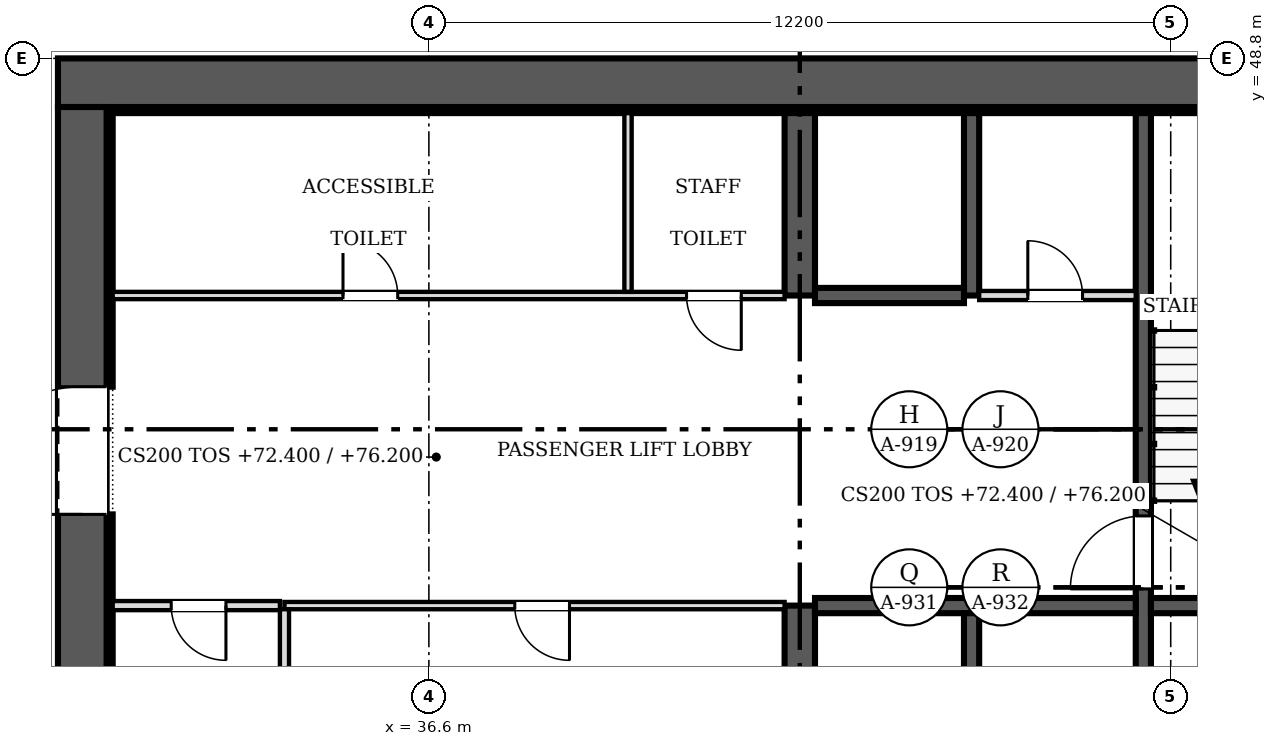
"""IFC4 building model, lengths in metres.
Left out: names, types, materials, properties, quantities, classifications, styles, units other than length and angle.
Written with IfcOpenShell. Run it as: python <this file> out.ifc"""

import sys

from ifc_helpers import new_model, si_unit, direction, frame, frame_2d, origin, place, context, subcontext, project, spatial, rectangle, extrude, source, transform, mapped, element, fill, save


model = new_model("IFC4")
c1 = context("Model", 3, precision=1e-05, world=origin(), true_north=direction((0.0, 1.0)))
c2 = subcontext(c1, "Body", "Model", "MODEL_VIEW")
j1 = project(units=[si_unit("LENGTHUNIT", "METRE"), si_unit("PLANEANGLEUNIT", "RADIAN")], contexts=[c1])
p1 = place(None, origin())
s1 = spatial("IfcSite", under=j1, at=p1, CompositionType="ELEMENT")
p2 = place(p1, origin())
s2 = spatial("IfcBuilding", under=s1, at=p2, CompositionType="ELEMENT")
p3 = place(p2, frame((0.0, 0.0, 72.4)))
s3 = spatial("IfcBuildingStorey", under=s2, at=p3, CompositionType="ELEMENT", Elevation=72.4)
p4 = place(p3, frame((30.9, 25.2, 0.0), z_axis=(0.0, 0.0, 1.0), x_axis=(0.0, 1.0, 0.0)))
e1 = element("IfcWall", 1, at=p4, inside=s3, PredefinedType="SHEAR", context=c2, shape_type="SweptSolid", body=[
    extrude(rectangle(XDim=22.8, YDim=0.8, at=frame_2d((11.4, 0.0))), origin(), (0.0, 0.0, 1.0), 3.8),
])
m1 = source(origin(), c2, "Body", "SweptSolid", [
    extrude(rectangle(XDim=2.1, YDim=2.4, at=frame_2d((1.05, 1.2))), frame((0.0, 0.41, 0.0), z_axis=(0.0, -1.0, 0.0), x_axis=(1.0, 0.0, 0.0)), (0.0, 0.0, 1.0), 0.82),
])
p5 = place(p4, frame((4.6, 0.0, 0.0)))
e2 = element("IfcOpeningElement", 2, at=p5, cuts=e1, PredefinedType="OPENING", context=c2, shape_type="MappedRepresentation", body=[
    mapped(m1, transform((0.0, 0.0, 0.0), scale=1.0)),
])
p6 = place(p4, frame((16.1, 0.0, 0.0)))
e3 = element("IfcOpeningElement", 3, at=p6, cuts=e1, PredefinedType="OPENING", context=c2, shape_type="MappedRepresentation", body=[
    mapped(m1, transform((0.0, 0.0, 0.0), scale=1.0)),
])
p7 = place(p3, frame((30.5, 48.4, 0.0), z_axis=(0.0, 0.0, 1.0), x_axis=(1.0, 0.0, 0.0)))
e4 = element("IfcWall", 4, at=p7, inside=s3, PredefinedType="SHEAR", context=c2, shape_type="SweptSolid", body=[
    extrude(rectangle(XDim=24.4, YDim=0.8, at=frame_2d((12.2, 0.0))), origin(), (0.0, 0.0, 1.0), 3.8),
])
p8 = place(p3, frame((31.3, 47.95, 0.0), z_axis=(0.0, 0.0, 1.0), x_axis=(1.0, 0.0, 0.0)))
e5 = element("IfcWall", 5, at=p8, inside=s3, PredefinedType="SOLIDWALL", context=c2, shape_type="SweptSolid", body=[
    extrude(rectangle(XDim=22.8, YDim=0.1, at=frame_2d((11.4, 0.0))), origin(), (0.0, 0.0, 1.0), 3.8),
])
p9 = place(p3, frame((31.35, 31.9, 0.0), z_axis=(0.0, 0.0, 1.0), x_axis=(0.0, 1.0, 0.0)))
e6 = element("IfcWall", 6, at=p9, inside=s3, PredefinedType="SOLIDWALL", context=c2, shape_type="SweptSolid", body=[
    extrude(rectangle(XDim=9.4, YDim=0.1, at=frame_2d((4.7, 0.0))), origin(), (0.0, 0.0, 1.0), 3.8),
])
p10 = place(p3, frame((31.35, 43.4, 0.0), z_axis=(0.0, 0.0, 1.0), x_axis=(0.0, 1.0, 0.0)))
e7 = element("IfcWall", 7, at=p10, inside=s3, PredefinedType="SOLIDWALL", context=c2, shape_type="SweptSolid", body=[
    extrude(rectangle(XDim=4.5, YDim=0.1, at=frame_2d((2.25, 0.0))), origin(), (0.0, 0.0, 1.0), 3.8),
])
p11 = place(p3, frame((42.7, 36.85, 0.0), z_axis=(0.0, 0.0, 1.0), x_axis=(0.0, 1.0, 0.0)))
e8 = element("IfcWall", 8, at=p11, inside=s3, PredefinedType="SHEAR", context=c2, shape_type="SweptSolid", body=[
    extrude(rectangle(XDim=2.95, YDim=0.5, at=frame_2d((1.475, 0.0))), origin(), (0.0, 0.0, 1.0), 3.8),
])
p12 = place(p3, frame((42.7, 44.9, 0.0), z_axis=(0.0, 0.0, 1.0), x_axis=(0.0, 1.0, 0.0)))
e9 = element("IfcWall", 9, at=p12, inside=s3, PredefinedType="SHEAR", context=c2, shape_type="SweptSolid", body=[
    extrude(rectangle(XDim=3.0, YDim=0.5, at=frame_2d((1.5, 0.0))), origin(), (0.0, 0.0, 1.0), 3.8),
])
p13 = place(p3, frame((48.35, 47.9, 0.0), z_axis=(0.0, 0.0, 1.0), x_axis=(0.0, -1.0, 0.0)))
e10 = element("IfcWall", 10, at=p13, inside=s3, PredefinedType="SOLIDWALL", context=c2, shape_type="SweptSolid", body=[
    extrude(rectangle(XDim=11.05, YDim=0.25, at=frame_2d((5.525, 0.0))), origin(), (0.0, 0.0, 1.0), 3.8),
])
m2 = source(origin(), c2, "Body", "SweptSolid", [
    extrude(rectangle(XDim=1.2, YDim=2.1, at=frame_2d((0.6, 1.05))), frame((0.0, 0.135, 0.0), z_axis=(0.0, -1.0, 0.0), x_axis=(1.0, 0.0, 0.0)), (0.0, 0.0, 1.0), 0.27),
])
p14 = place(p13, frame((6.625, 0.0, 0.0)))
e11 = element("IfcOpeningElement", 11, at=p14, cuts=e10, PredefinedType="OPENING", context=c2, shape_type="MappedRepresentation", body=[
    mapped(m2, transform((0.0, 0.0, 0.0), scale=1.0)),
])
p15 = place(p3, frame((42.95, 39.8, 0.0), z_axis=(0.0, 0.0, 1.0), x_axis=(1.0, 0.0, 0.0)))
e12 = element("IfcWall", 12, at=p15, inside=s3, PredefinedType="SOLIDWALL", context=c2, shape_type="SweptSolid", body=[
    extrude(rectangle(XDim=5.275, YDim=0.25, at=frame_2d((2.638, 0.0))), origin(), (0.0, 0.0, 1.0), 3.8),
])
p16 = place(p3, frame((48.475, 39.8, 0.0), z_axis=(0.0, 0.0, 1.0), x_axis=(1.0, 0.0, 0.0)))
e13 = element("IfcWall", 13, at=p16, inside=s3, PredefinedType="SOLIDWALL", context=c2, shape_type="SweptSolid", body=[
    extrude(rectangle(XDim=3.525, YDim=0.25, at=frame_2d((1.762, 0.0))), origin(), (0.0, 0.0, 1.0), 3.8),
])
p17 = place(p3, frame((45.525, 36.85, 0.0), z_axis=(0.0, 0.0, 1.0), x_axis=(0.0, 1.0, 0.0)))
e14 = element("IfcWall", 14, at=p17, inside=s3, PredefinedType="SOLIDWALL", context=c2, shape_type="SweptSolid", body=[
    extrude(rectangle(XDim=2.825, YDim=0.25, at=frame_2d((1.413, 0.0))), origin(), (0.0, 0.0, 1.0), 3.8),
])
p18 = place(p3, frame((45.525, 44.9, 0.0), z_axis=(0.0, 0.0, 1.0), x_axis=(0.0, 1.0, 0.0)))
e15 = element("IfcWall", 15, at=p18, inside=s3, PredefinedType="SOLIDWALL", context=c2, shape_type="SweptSolid", body=[
    extrude(rectangle(XDim=3.0, YDim=0.25, at=frame_2d((1.5, 0.0))), origin(), (0.0, 0.0, 1.0), 3.8),
])
p19 = place(p3, frame((42.95, 44.9, 0.0), z_axis=(0.0, 0.0, 1.0), x_axis=(1.0, 0.0, 0.0)))
e16 = element("IfcWall", 16, at=p19, inside=s3, PredefinedType="SOLIDWALL", context=c2, shape_type="SweptSolid", body=[
    extrude(rectangle(XDim=2.45, YDim=0.25, at=frame_2d((1.225, 0.0))), origin(), (0.0, 0.0, 1.0), 3.8),
])
p20 = place(p3, frame((31.4, 44.9, 0.0), z_axis=(0.0, 0.0, 1.0), x_axis=(1.0, 0.0, 0.0)))
e17 = element("IfcWall", 17, at=p20, inside=s3, PredefinedType="PARTITIONING", context=c2, shape_type="SweptSolid", body=[
    extrude(rectangle(XDim=11.05, YDim=0.12, at=frame_2d((5.525, 0.0))), origin(), (0.0, 0.0, 1.0), 3.6),
])
m3 = source(origin(), c2, "Body", "SweptSolid", [
    extrude(rectangle(XDim=0.9, YDim=2.1, at=frame_2d((0.45, 1.05))), frame((0.0, 0.07, 0.0), z_axis=(0.0, -1.0, 0.0), x_axis=(1.0, 0.0, 0.0)), (0.0, 0.0, 1.0), 0.14),
])
p21 = place(p20, frame((3.788, 0.0, 0.0)))
e18 = element("IfcOpeningElement", 18, at=p21, cuts=e17, PredefinedType="OPENING", context=c2, shape_type="MappedRepresentation", body=[
    mapped(m3, transform((0.0, 0.0, 0.0), scale=1.0)),
])
p22 = place(p20, frame((9.438, 0.0, 0.0)))
e19 = element("IfcOpeningElement", 19, at=p22, cuts=e17, PredefinedType="OPENING", context=c2, shape_type="MappedRepresentation", body=[
    mapped(m3, transform((0.0, 0.0, 0.0), scale=1.0)),
])
p23 = place(p3, frame((42.45, 39.8, 0.0), z_axis=(0.0, 0.0, 1.0), x_axis=(-1.0, 0.0, 0.0)))
e20 = element("IfcWall", 20, at=p23, inside=s3, PredefinedType="PARTITIONING", context=c2, shape_type="SweptSolid", body=[
    extrude(rectangle(XDim=8.225, YDim=0.12, at=frame_2d((4.112, 0.0))), origin(), (0.0, 0.0, 1.0), 3.6),
])
p24 = place(p23, frame((3.538, 0.0, 0.0)))
e21 = element("IfcOpeningElement", 21, at=p24, cuts=e20, PredefinedType="OPENING", context=c2, shape_type="MappedRepresentation", body=[
    mapped(m3, transform((0.0, 0.0, 0.0), scale=1.0)),
])
p25 = place(p3, frame((34.225, 36.85, 0.0), z_axis=(0.0, 0.0, 1.0), x_axis=(0.0, 1.0, 0.0)))
e22 = element("IfcWall", 22, at=p25, inside=s3, PredefinedType="PARTITIONING", context=c2, shape_type="SweptSolid", body=[
    extrude(rectangle(XDim=2.89, YDim=0.15, at=frame_2d((1.445, 0.0))), origin(), (0.0, 0.0, 1.0), 3.6),
])
p26 = place(p3, frame((39.875, 44.96, 0.0), z_axis=(0.0, 0.0, 1.0), x_axis=(0.0, 1.0, 0.0)))
e23 = element("IfcWall", 23, at=p26, inside=s3, PredefinedType="PARTITIONING", context=c2, shape_type="SweptSolid", body=[
    extrude(rectangle(XDim=2.94, YDim=0.12, at=frame_2d((1.47, 0.0))), origin(), (0.0, 0.0, 1.0), 3.6),
])
p27 = place(p3, frame((45.65, 44.9, 0.0), z_axis=(0.0, 0.0, 1.0), x_axis=(1.0, 0.0, 0.0)))
e24 = element("IfcWall", 24, at=p27, inside=s3, PredefinedType="PARTITIONING", context=c2, shape_type="SweptSolid", body=[
    extrude(rectangle(XDim=2.575, YDim=0.15, at=frame_2d((1.288, 0.0))), origin(), (0.0, 0.0, 1.0), 3.6),
])
m4 = source(origin(), c2, "Body", "SweptSolid", [
    extrude(rectangle(XDim=0.9, YDim=2.1, at=frame_2d((0.45, 1.05))), frame((0.0, 0.085, 0.0), z_axis=(0.0, -1.0, 0.0), x_axis=(1.0, 0.0, 0.0)), (0.0, 0.0, 1.0), 0.17),
])
p28 = place(p27, frame((0.8, 0.0, 0.0)))
e25 = element("IfcOpeningElement", 25, at=p28, cuts=e24, PredefinedType="OPENING", context=c2, shape_type="MappedRepresentation", body=[
    mapped(m4, transform((0.0, 0.0, 0.0), scale=1.0)),
])
p29 = place(p3, frame((34.15, 39.8, 0.0), z_axis=(0.0, 0.0, 1.0), x_axis=(-1.0, 0.0, 0.0)))
e26 = element("IfcWall", 26, at=p29, inside=s3, PredefinedType="PARTITIONING", context=c2, shape_type="SweptSolid", body=[
    extrude(rectangle(XDim=2.75, YDim=0.15, at=frame_2d((1.375, 0.0))), origin(), (0.0, 0.0, 1.0), 3.6),
])
p30 = place(p29, frame((0.887, 0.0, 0.0)))
e27 = element("IfcOpeningElement", 27, at=p30, cuts=e26, PredefinedType="OPENING", context=c2, shape_type="MappedRepresentation", body=[
    mapped(m4, transform((0.0, 0.0, 0.0), scale=1.0)),
])
m5 = source(origin(), c2, "Body", "SweptSolid", [
    extrude(rectangle(XDim=2.1, YDim=2.4, at=frame_2d((1.05, 1.2))), frame((0.0, 0.025, 0.0), z_axis=(0.0, -1.0, 0.0), x_axis=(1.0, 0.0, 0.0)), (0.0, 0.0, 1.0), 0.05),
])
p31 = place(p6, origin())
e28 = element("IfcDoor", 28, at=p31, inside=s3, OperationType="DOUBLE_DOOR_SINGLE_SWING", PredefinedType="DOOR", context=c2, shape_type="MappedRepresentation", body=[
    mapped(m5, transform((0.0, 0.0, 0.0), scale=1.0)),
])
fill(e3, e28)
m6 = source(origin(), c2, "Body", "SweptSolid", [
    extrude(rectangle(XDim=1.2, YDim=2.1, at=frame_2d((0.6, 1.05))), frame((0.0, 0.025, 0.0), z_axis=(0.0, -1.0, 0.0), x_axis=(1.0, 0.0, 0.0)), (0.0, 0.0, 1.0), 0.05),
])
p32 = place(p14, origin())
e29 = element("IfcDoor", 29, at=p32, inside=s3, OperationType="SINGLE_SWING_RIGHT", PredefinedType="DOOR", context=c2, shape_type="MappedRepresentation", body=[
    mapped(m6, transform((0.0, 0.0, 0.0), scale=1.0)),
])
fill(e11, e29)
m7 = source(origin(), c2, "Body", "SweptSolid", [
    extrude(rectangle(XDim=0.9, YDim=2.1, at=frame_2d((0.45, 1.05))), frame((0.0, 0.025, 0.0), z_axis=(0.0, -1.0, 0.0), x_axis=(1.0, 0.0, 0.0)), (0.0, 0.0, 1.0), 0.05),
])
p33 = place(p21, origin())
e30 = element("IfcDoor", 30, at=p33, inside=s3, OperationType="SINGLE_SWING_LEFT", PredefinedType="DOOR", context=c2, shape_type="MappedRepresentation", body=[
    mapped(m7, transform((0.0, 0.0, 0.0), scale=1.0)),
])
fill(e18, e30)
p34 = place(p22, origin())
e31 = element("IfcDoor", 31, at=p34, inside=s3, OperationType="SINGLE_SWING_RIGHT", PredefinedType="DOOR", context=c2, shape_type="MappedRepresentation", body=[
    mapped(m7, transform((0.0, 0.0, 0.0), scale=1.0)),
])
fill(e19, e31)
p35 = place(p24, origin())
e32 = element("IfcDoor", 32, at=p35, inside=s3, OperationType="SINGLE_SWING_LEFT", PredefinedType="DOOR", context=c2, shape_type="MappedRepresentation", body=[
    mapped(m7, transform((0.0, 0.0, 0.0), scale=1.0)),
])
fill(e21, e32)
p36 = place(p28, origin())
e33 = element("IfcDoor", 33, at=p36, inside=s3, OperationType="SINGLE_SWING_LEFT", PredefinedType="DOOR", context=c2, shape_type="MappedRepresentation", body=[
    mapped(m7, transform((0.0, 0.0, 0.0), scale=1.0)),
])
fill(e25, e33)
p37 = place(p30, origin())
e34 = element("IfcDoor", 34, at=p37, inside=s3, OperationType="SINGLE_SWING_LEFT", PredefinedType="DOOR", context=c2, shape_type="MappedRepresentation", body=[
    mapped(m7, transform((0.0, 0.0, 0.0), scale=1.0)),
])
fill(e27, e34)
save(model, sys.argv[1])
